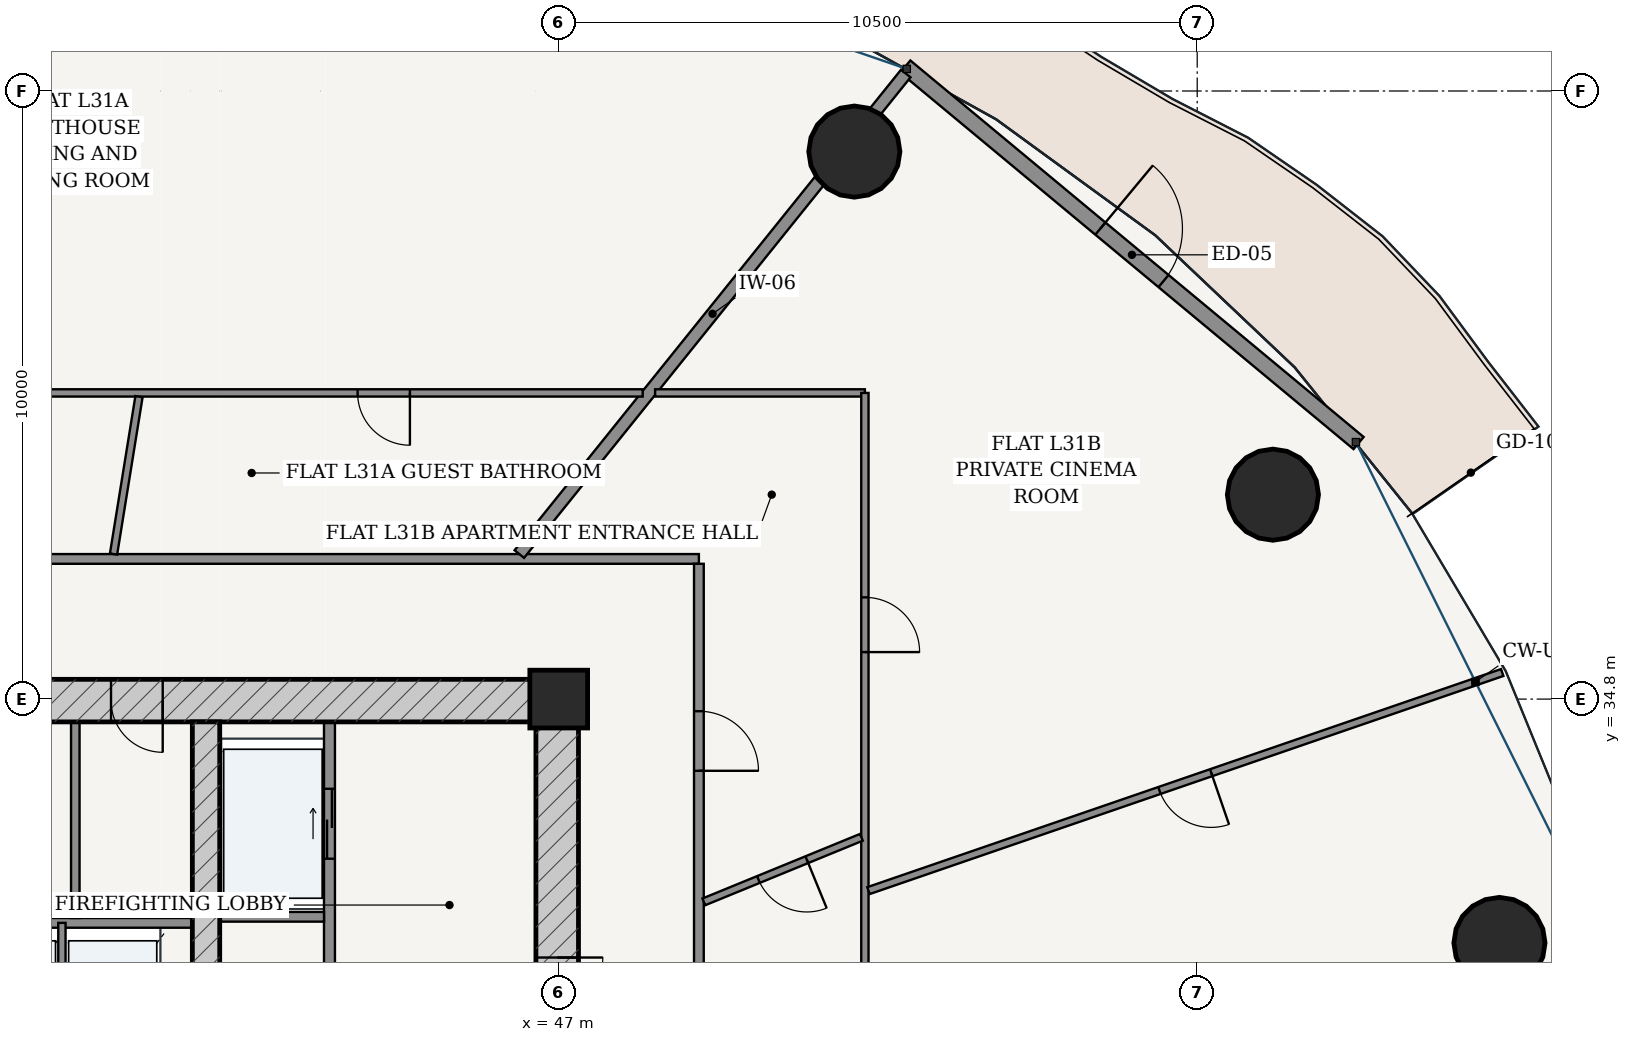
"""IFC4 building model, lengths in metres.
Left out: names, types, materials, properties, quantities, classifications, styles, units other than length and angle.
Written with IfcOpenShell. Run it as: python <this file> out.ifc"""

import sys

from ifc_helpers import new_model, si_unit, direction, frame, frame_2d, origin, origin_2d, place, context, subcontext, project, spatial, rectangle, hollow_circle, extrude, source, transform, mapped, element, fill, save


model = new_model("IFC4")
c1 = context("Model", 3, precision=1e-05, world=origin(), true_north=direction((-0.2419218956, 0.970295726276)))
c2 = subcontext(c1, "Body", "Model", "MODEL_VIEW")
j1 = project(units=[si_unit("LENGTHUNIT", "METRE"), si_unit("PLANEANGLEUNIT", "RADIAN")], contexts=[c1])
p1 = place(None, origin())
s1 = spatial("IfcSite", under=j1, at=p1, CompositionType="ELEMENT")
p2 = place(p1, origin())
s2 = spatial("IfcBuilding", under=s1, at=p2, CompositionType="ELEMENT")
p3 = place(p2, frame((0.0, 0.0, 119.4)))
s3 = spatial("IfcBuildingStorey", under=s2, at=p3, CompositionType="ELEMENT", Elevation=119.4)
p4 = place(p3, frame((47.0, 34.8, 0.0), z_axis=(0.0, 0.0, 1.0), x_axis=(1.0, 0.0, 0.0)))
e1 = element("IfcColumn", 1, at=p4, inside=s3, PredefinedType="COLUMN", context=c2, shape_type="SweptSolid", body=[
    extrude(rectangle(XDim=0.95, YDim=0.95, at=origin_2d()), origin(), (0.0, 0.0, 1.0), 3.6),
])
p5 = place(p3, frame((28.675, 34.775, 0.0), z_axis=(0.0, 0.0, 1.0), x_axis=(1.0, 0.0, 0.0)))
e2 = element("IfcWall", 2, at=p5, inside=s3, PredefinedType="SHEAR", context=c2, shape_type="SweptSolid", body=[
    extrude(rectangle(XDim=18.65, YDim=0.7, at=frame_2d((9.325, 0.0))), origin(), (0.0, 0.0, 1.0), 3.325),
])
p6 = place(p5, frame((6.837, 0.0, 0.0)))
e3 = element("IfcOpeningElement", 3, at=p6, cuts=e2, PredefinedType="OPENING", context=c2, shape_type="SweptSolid", body=[
    extrude(rectangle(XDim=0.85, YDim=2.1, at=frame_2d((0.425, 1.05))), frame((0.0, 0.36, 0.0), z_axis=(0.0, -1.0, 0.0), x_axis=(1.0, 0.0, 0.0)), (0.0, 0.0, 1.0), 0.72),
])
p7 = place(p5, frame((8.895, 0.0, 0.0)))
e4 = element("IfcOpeningElement", 4, at=p7, cuts=e2, PredefinedType="OPENING", context=c2, shape_type="SweptSolid", body=[
    extrude(rectangle(XDim=0.86, YDim=2.1, at=frame_2d((0.43, 1.05))), frame((0.0, 0.36, 0.0), z_axis=(0.0, -1.0, 0.0), x_axis=(1.0, 0.0, 0.0)), (0.0, 0.0, 1.0), 0.72),
])
p8 = place(p5, frame((10.962, 0.0, 0.0)))
e5 = element("IfcOpeningElement", 5, at=p8, cuts=e2, PredefinedType="OPENING", context=c2, shape_type="SweptSolid", body=[
    extrude(rectangle(XDim=0.85, YDim=2.1, at=frame_2d((0.425, 1.05))), frame((0.0, 0.36, 0.0), z_axis=(0.0, -1.0, 0.0), x_axis=(1.0, 0.0, 0.0)), (0.0, 0.0, 1.0), 0.72),
])
p9 = place(p3, frame((46.975, 19.175, 0.0), z_axis=(0.0, 0.0, 1.0), x_axis=(0.0, 1.0, 0.0)))
e6 = element("IfcWall", 6, at=p9, inside=s3, PredefinedType="SHEAR", context=c2, shape_type="SweptSolid", body=[
    extrude(rectangle(XDim=15.25, YDim=0.7, at=frame_2d((7.625, 0.0))), origin(), (0.0, 0.0, 1.0), 3.325),
])
p10 = place(p9, frame((9.875, 0.0, 0.0)))
e7 = element("IfcOpeningElement", 7, at=p10, cuts=e6, PredefinedType="OPENING", context=c2, shape_type="SweptSolid", body=[
    extrude(rectangle(XDim=1.5, YDim=2.2, at=frame_2d((0.75, 1.1))), frame((0.0, 0.36, 0.0), z_axis=(0.0, -1.0, 0.0), x_axis=(1.0, 0.0, 0.0)), (0.0, 0.0, 1.0), 0.72),
])
p11 = place(p3, frame((41.2, 19.175, 0.0), z_axis=(0.0, 0.0, 1.0), x_axis=(0.0, 1.0, 0.0)))
e8 = element("IfcWall", 8, at=p11, inside=s3, PredefinedType="SHEAR", context=c2, shape_type="SweptSolid", body=[
    extrude(rectangle(XDim=15.25, YDim=0.45, at=frame_2d((7.625, 0.0))), origin(), (0.0, 0.0, 1.0), 3.325),
])
p12 = place(p11, frame((7.8, 0.0, 0.0)))
e9 = element("IfcOpeningElement", 9, at=p12, cuts=e8, PredefinedType="OPENING", context=c2, shape_type="SweptSolid", body=[
    extrude(rectangle(XDim=1.05, YDim=2.15, at=frame_2d((0.525, 1.075))), frame((0.0, 0.235, 0.0), z_axis=(0.0, -1.0, 0.0), x_axis=(1.0, 0.0, 0.0)), (0.0, 0.0, 1.0), 0.47),
])
for number, where, z_axis, x_axis in (
    (10, (62.471, 30.79, 0.0), (0.0, 0.0, 1.0), (1.0, 0.0, 0.0)),
    (11, (58.745, 38.161, 0.0), (0.0, 0.0, 1.0), (1.0, 0.0, 0.0)),
    (12, (51.862, 43.803, 0.0), (0.0, 0.0, 1.0), (1.0, 0.0, 0.0)),
):
    element("IfcColumn", number, at=place(p3, frame(where, z_axis=z_axis, x_axis=x_axis)), inside=s3, PredefinedType="COLUMN", context=c2, shape_type="SweptSolid", body=[
        extrude(hollow_circle(Radius=0.75, WallThickness=0.045, at=origin_2d()), origin(), (0.0, 0.0, 1.0), 3.6),
    ])
p13 = place(p3, frame((60.154, 39.01, 0.0), z_axis=(0.0, 0.0, 1.0), x_axis=(-0.769242574941, 0.638956853706, 0.0)))
e13 = element("IfcWall", 13, at=p13, inside=s3, PredefinedType="SOLIDWALL", context=c2, shape_type="SweptSolid", body=[
    extrude(rectangle(XDim=9.69, YDim=0.26, at=frame_2d((4.845, 0.0))), origin(), (0.0, 0.0, 1.0), 3.325),
])
p14 = place(p13, frame((4.17, 0.0, 0.0)))
e14 = element("IfcOpeningElement", 14, at=p14, cuts=e13, PredefinedType="OPENING", context=c2, shape_type="SweptSolid", body=[
    extrude(rectangle(XDim=1.35, YDim=2.2, at=frame_2d((0.675, 1.1))), frame((0.0, 0.14, 0.0), z_axis=(0.0, -1.0, 0.0), x_axis=(1.0, 0.0, 0.0)), (0.0, 0.0, 1.0), 0.28),
])
p15 = place(p3, frame((43.23, 28.52, 0.0), z_axis=(0.0, 0.0, 1.0), x_axis=(0.0, 1.0, 0.0)))
e15 = element("IfcWall", 15, at=p15, inside=s3, PredefinedType="PARTITIONING", context=c2, shape_type="SweptSolid", body=[
    extrude(rectangle(XDim=5.905, YDim=0.18, at=frame_2d((2.953, 0.0))), origin(), (0.0, 0.0, 1.0), 3.325),
])
p16 = place(p15, frame((0.905, 0.0, 0.0)))
e16 = element("IfcOpeningElement", 16, at=p16, cuts=e15, PredefinedType="OPENING", context=c2, shape_type="SweptSolid", body=[
    extrude(rectangle(XDim=0.85, YDim=2.1, at=frame_2d((0.425, 1.05))), frame((0.0, 0.1, 0.0), z_axis=(0.0, -1.0, 0.0), x_axis=(1.0, 0.0, 0.0)), (0.0, 0.0, 1.0), 0.2),
])
p17 = place(p15, frame((3.655, 0.0, 0.0)))
e17 = element("IfcOpeningElement", 17, at=p17, cuts=e15, PredefinedType="OPENING", context=c2, shape_type="SweptSolid", body=[
    extrude(rectangle(XDim=1.15, YDim=2.2, at=frame_2d((0.575, 1.1))), frame((0.0, 0.1, 0.0), z_axis=(0.0, -1.0, 0.0), x_axis=(1.0, 0.0, 0.0)), (0.0, 0.0, 1.0), 0.2),
])
p18 = place(p3, frame((41.425, 31.22, 0.0), z_axis=(0.0, 0.0, 1.0), x_axis=(1.0, 0.0, 0.0)))
e18 = element("IfcWall", 18, at=p18, inside=s3, PredefinedType="PARTITIONING", context=c2, shape_type="SweptSolid", body=[
    extrude(rectangle(XDim=1.715, YDim=0.16, at=frame_2d((0.857, 0.0))), origin(), (0.0, 0.0, 1.0), 3.325),
])
p19 = place(p3, frame((35.025, 31.12, 0.0), z_axis=(0.0, 0.0, 1.0), x_axis=(1.0, 0.0, 0.0)))
e19 = element("IfcWall", 19, at=p19, inside=s3, PredefinedType="PARTITIONING", context=c2, shape_type="SweptSolid", body=[
    extrude(rectangle(XDim=5.95, YDim=0.16, at=frame_2d((2.975, 0.0))), origin(), (0.0, 0.0, 1.0), 3.325),
])
p20 = place(p3, frame((38.83, 28.56, 0.0), z_axis=(0.0, 0.0, 1.0), x_axis=(0.0, 1.0, 0.0)))
e20 = element("IfcWall", 20, at=p20, inside=s3, PredefinedType="PARTITIONING", context=c2, shape_type="SweptSolid", body=[
    extrude(rectangle(XDim=2.56, YDim=0.12, at=frame_2d((1.28, 0.0))), origin(), (0.0, 0.0, 1.0), 3.325),
])
p21 = place(p3, frame((39.05, 31.2, 0.0), z_axis=(0.0, 0.0, 1.0), x_axis=(0.0, 1.0, 0.0)))
e21 = element("IfcWall", 21, at=p21, inside=s3, PredefinedType="PARTITIONING", context=c2, shape_type="SweptSolid", body=[
    extrude(rectangle(XDim=3.225, YDim=0.14, at=frame_2d((1.613, 0.0))), origin(), (0.0, 0.0, 1.0), 3.325),
])
p22 = place(p3, frame((26.695, 37.105, 0.0), z_axis=(0.0, 0.0, 1.0), x_axis=(1.0, 0.0, 0.0)))
e22 = element("IfcWall", 22, at=p22, inside=s3, PredefinedType="PARTITIONING", context=c2, shape_type="SweptSolid", body=[
    extrude(rectangle(XDim=22.61, YDim=0.16, at=frame_2d((11.305, 0.0))), origin(), (0.0, 0.0, 1.0), 2.767),
])
p23 = place(p3, frame((49.305, 16.575, 0.0), z_axis=(0.0, 0.0, 1.0), x_axis=(0.0, 1.0, 0.0)))
e23 = element("IfcWall", 23, at=p23, inside=s3, PredefinedType="PARTITIONING", context=c2, shape_type="SweptSolid", body=[
    extrude(rectangle(XDim=20.45, YDim=0.16, at=frame_2d((10.225, 0.0))), origin(), (0.0, 0.0, 1.0), 2.767),
])
p24 = place(p23, frame((17.046, 0.0, 0.0)))
e24 = element("IfcOpeningElement", 24, at=p24, cuts=e23, PredefinedType="OPENING", context=c2, shape_type="SweptSolid", body=[
    extrude(rectangle(XDim=0.98, YDim=2.2, at=frame_2d((0.49, 1.1))), frame((0.0, 0.09, 0.0), z_axis=(0.0, -1.0, 0.0), x_axis=(1.0, 0.0, 0.0)), (0.0, 0.0, 1.0), 0.18),
])
p25 = place(p3, frame((46.352, 37.185, 0.0), z_axis=(0.0, 0.0, 1.0), x_axis=(0.626712884514, 0.779250255299, 0.0)))
e25 = element("IfcWall", 25, at=p25, inside=s3, PredefinedType="PARTITIONING", context=c2, shape_type="SweptSolid", body=[
    extrude(rectangle(XDim=10.141, YDim=0.2, at=frame_2d((5.07, 0.0))), origin(), (0.0, 0.0, 1.0), 2.767),
])
p26 = place(p3, frame((23.965, 39.835, 0.0), z_axis=(0.0, 0.0, 1.0), x_axis=(1.0, 0.0, 0.0)))
e26 = element("IfcWall", 26, at=p26, inside=s3, PredefinedType="PARTITIONING", context=c2, shape_type="SweptSolid", body=[
    extrude(rectangle(XDim=24.416, YDim=0.12, at=frame_2d((12.208, 0.0))), origin(), (0.0, 0.0, 1.0), 2.767),
])
p27 = place(p26, frame((4.192, 0.0, 0.0)))
e27 = element("IfcOpeningElement", 27, at=p27, cuts=e26, PredefinedType="OPENING", context=c2, shape_type="SweptSolid", body=[
    extrude(rectangle(XDim=0.9, YDim=2.15, at=frame_2d((0.45, 1.075))), frame((0.0, 0.07, 0.0), z_axis=(0.0, -1.0, 0.0), x_axis=(1.0, 0.0, 0.0)), (0.0, 0.0, 1.0), 0.14),
])
p28 = place(p26, frame((19.728, 0.0, 0.0)))
e28 = element("IfcOpeningElement", 28, at=p28, cuts=e26, PredefinedType="OPENING", context=c2, shape_type="SweptSolid", body=[
    extrude(rectangle(XDim=0.86, YDim=2.15, at=frame_2d((0.43, 1.075))), frame((0.0, 0.07, 0.0), z_axis=(0.0, -1.0, 0.0), x_axis=(1.0, 0.0, 0.0)), (0.0, 0.0, 1.0), 0.14),
])
p29 = place(p3, frame((39.679, 37.185, 0.0), z_axis=(0.0, 0.0, 1.0), x_axis=(0.159580767408, 0.98718487563, 0.0)))
e29 = element("IfcWall", 29, at=p29, inside=s3, PredefinedType="PARTITIONING", context=c2, shape_type="SweptSolid", body=[
    extrude(rectangle(XDim=2.622, YDim=0.12, at=frame_2d((1.311, 0.0))), origin(), (0.0, 0.0, 1.0), 3.325),
])
p30 = place(p3, frame((48.585, 39.835, 0.0), z_axis=(0.0, 0.0, 1.0), x_axis=(1.0, 0.0, 0.0)))
e30 = element("IfcWall", 30, at=p30, inside=s3, PredefinedType="PARTITIONING", context=c2, shape_type="SweptSolid", body=[
    extrude(rectangle(XDim=3.45, YDim=0.12, at=frame_2d((1.725, 0.0))), origin(), (0.0, 0.0, 1.0), 2.767),
])
p31 = place(p3, frame((52.035, 39.835, 0.0), z_axis=(0.0, 0.0, 1.0), x_axis=(0.0, -1.0, 0.0)))
e31 = element("IfcWall", 31, at=p31, inside=s3, PredefinedType="PARTITIONING", context=c2, shape_type="SweptSolid", body=[
    extrude(rectangle(XDim=26.07, YDim=0.12, at=frame_2d((13.035, 0.0))), origin(), (0.0, 0.0, 1.0), 2.767),
])
p32 = place(p31, frame((3.362, 0.0, 0.0)))
e32 = element("IfcOpeningElement", 32, at=p32, cuts=e31, PredefinedType="OPENING", context=c2, shape_type="SweptSolid", body=[
    extrude(rectangle(XDim=0.9, YDim=2.15, at=frame_2d((0.45, 1.075))), frame((0.0, 0.07, 0.0), z_axis=(0.0, -1.0, 0.0), x_axis=(1.0, 0.0, 0.0)), (0.0, 0.0, 1.0), 0.14),
])
p33 = place(p31, frame((13.924, 0.0, 0.0)))
e33 = element("IfcOpeningElement", 33, at=p33, cuts=e31, PredefinedType="OPENING", context=c2, shape_type="SweptSolid", body=[
    extrude(rectangle(XDim=0.9, YDim=2.15, at=frame_2d((0.45, 1.075))), frame((0.0, 0.07, 0.0), z_axis=(0.0, -1.0, 0.0), x_axis=(1.0, 0.0, 0.0)), (0.0, 0.0, 1.0), 0.14),
])
p34 = place(p3, frame((52.094, 31.65, 0.0), z_axis=(0.0, 0.0, 1.0), x_axis=(0.945573120726, 0.32540970078, 0.0)))
e34 = element("IfcWall", 34, at=p34, inside=s3, PredefinedType="PARTITIONING", context=c2, shape_type="SweptSolid", body=[
    extrude(rectangle(XDim=11.022, YDim=0.12, at=frame_2d((5.511, 0.0))), origin(), (0.0, 0.0, 1.0), 2.767),
])
p35 = place(p34, frame((5.061, 0.0, 0.0)))
e35 = element("IfcOpeningElement", 35, at=p35, cuts=e34, PredefinedType="OPENING", context=c2, shape_type="SweptSolid", body=[
    extrude(rectangle(XDim=0.9, YDim=2.15, at=frame_2d((0.45, 1.075))), frame((0.0, 0.07, 0.0), z_axis=(0.0, -1.0, 0.0), x_axis=(1.0, 0.0, 0.0)), (0.0, 0.0, 1.0), 0.14),
])
p36 = place(p3, frame((49.387, 31.465, 0.0), z_axis=(0.0, 0.0, 1.0), x_axis=(0.925328713836, 0.37916588896, 0.0)))
e36 = element("IfcWall", 36, at=p36, inside=s3, PredefinedType="PARTITIONING", context=c2, shape_type="SweptSolid", body=[
    extrude(rectangle(XDim=2.8, YDim=0.12, at=frame_2d((1.4, 0.0))), origin(), (0.0, 0.0, 1.0), 3.325),
])
p37 = place(p36, frame((0.97, 0.0, 0.0)))
e37 = element("IfcOpeningElement", 37, at=p37, cuts=e36, PredefinedType="OPENING", context=c2, shape_type="SweptSolid", body=[
    extrude(rectangle(XDim=0.86, YDim=2.15, at=frame_2d((0.43, 1.075))), frame((0.0, 0.07, 0.0), z_axis=(0.0, -1.0, 0.0), x_axis=(1.0, 0.0, 0.0)), (0.0, 0.0, 1.0), 0.14),
])
m1 = source(origin(), c2, "Body", "SweptSolid", [
    extrude(rectangle(XDim=1.35, YDim=2.2, at=frame_2d((0.675, 1.1))), frame((0.0, 0.025, 0.0), z_axis=(0.0, -1.0, 0.0), x_axis=(1.0, 0.0, 0.0)), (0.0, 0.0, 1.0), 0.05),
])
p38 = place(p14, frame((1.35, 0.0, 0.0), z_axis=(0.0, 0.0, 1.0), x_axis=(-1.0, 0.0, 0.0)))
e38 = element("IfcDoor", 38, at=p38, inside=s3, OperationType="SINGLE_SWING_LEFT", PredefinedType="DOOR", context=c2, shape_type="MappedRepresentation", body=[
    mapped(m1, transform((0.0, 0.0, 0.0), scale=1.0)),
])
fill(e14, e38)
m2 = source(origin(), c2, "Body", "SweptSolid", [
    extrude(rectangle(XDim=1.5, YDim=2.2, at=frame_2d((0.75, 1.1))), frame((0.0, 0.025, 0.0), z_axis=(0.0, -1.0, 0.0), x_axis=(1.0, 0.0, 0.0)), (0.0, 0.0, 1.0), 0.05),
])
p39 = place(p10, frame((1.5, 0.0, 0.0), z_axis=(0.0, 0.0, 1.0), x_axis=(-1.0, 0.0, 0.0)))
e39 = element("IfcDoor", 39, at=p39, inside=s3, OperationType="DOUBLE_DOOR_SINGLE_SWING", PredefinedType="DOOR", context=c2, shape_type="MappedRepresentation", body=[
    mapped(m2, transform((0.0, 0.0, 0.0), scale=1.0)),
])
fill(e7, e39)
m3 = source(origin(), c2, "Body", "SweptSolid", [
    extrude(rectangle(XDim=0.85, YDim=2.1, at=frame_2d((0.425, 1.05))), frame((0.0, 0.025, 0.0), z_axis=(0.0, -1.0, 0.0), x_axis=(1.0, 0.0, 0.0)), (0.0, 0.0, 1.0), 0.05),
])
p40 = place(p8, frame((0.85, 0.0, 0.0), z_axis=(0.0, 0.0, 1.0), x_axis=(-1.0, 0.0, 0.0)))
e40 = element("IfcDoor", 40, at=p40, inside=s3, OperationType="SINGLE_SWING_LEFT", PredefinedType="DOOR", context=c2, shape_type="MappedRepresentation", body=[
    mapped(m3, transform((0.0, 0.0, 0.0), scale=1.0)),
])
fill(e5, e40)
m4 = source(origin(), c2, "Body", "SweptSolid", [
    extrude(rectangle(XDim=1.15, YDim=2.2, at=frame_2d((0.575, 1.1))), frame((0.0, 0.025, 0.0), z_axis=(0.0, -1.0, 0.0), x_axis=(1.0, 0.0, 0.0)), (0.0, 0.0, 1.0), 0.05),
])
p41 = place(p17, origin())
e41 = element("IfcDoor", 41, at=p41, inside=s3, OperationType="DOUBLE_DOOR_SLIDING", PredefinedType="DOOR", context=c2, shape_type="MappedRepresentation", body=[
    mapped(m4, transform((0.0, 0.0, 0.0), scale=1.0)),
])
fill(e17, e41)
m5 = source(origin(), c2, "Body", "SweptSolid", [
    extrude(rectangle(XDim=0.86, YDim=2.15, at=frame_2d((0.43, 1.075))), frame((0.0, 0.025, 0.0), z_axis=(0.0, -1.0, 0.0), x_axis=(1.0, 0.0, 0.0)), (0.0, 0.0, 1.0), 0.05),
])
p42 = place(p28, frame((0.86, 0.0, 0.0), z_axis=(0.0, 0.0, 1.0), x_axis=(-1.0, 0.0, 0.0)))
e42 = element("IfcDoor", 42, at=p42, inside=s3, OperationType="SINGLE_SWING_LEFT", PredefinedType="DOOR", context=c2, shape_type="MappedRepresentation", body=[
    mapped(m5, transform((0.0, 0.0, 0.0), scale=1.0)),
])
fill(e28, e42)
m6 = source(origin(), c2, "Body", "SweptSolid", [
    extrude(rectangle(XDim=0.98, YDim=2.2, at=frame_2d((0.49, 1.1))), frame((0.0, 0.025, 0.0), z_axis=(0.0, -1.0, 0.0), x_axis=(1.0, 0.0, 0.0)), (0.0, 0.0, 1.0), 0.05),
])
p43 = place(p24, frame((0.98, 0.0, 0.0), z_axis=(0.0, 0.0, 1.0), x_axis=(-1.0, 0.0, 0.0)))
e43 = element("IfcDoor", 43, at=p43, inside=s3, OperationType="SINGLE_SWING_RIGHT", PredefinedType="DOOR", context=c2, shape_type="MappedRepresentation", body=[
    mapped(m6, transform((0.0, 0.0, 0.0), scale=1.0)),
])
fill(e24, e43)
p44 = place(p37, frame((0.86, 0.0, 0.0), z_axis=(0.0, 0.0, 1.0), x_axis=(-1.0, 0.0, 0.0)))
e44 = element("IfcDoor", 44, at=p44, inside=s3, OperationType="SINGLE_SWING_LEFT", PredefinedType="DOOR", context=c2, shape_type="MappedRepresentation", body=[
    mapped(m5, transform((0.0, 0.0, 0.0), scale=1.0)),
])
fill(e37, e44)
m7 = source(origin(), c2, "Body", "SweptSolid", [
    extrude(rectangle(XDim=0.9, YDim=2.15, at=frame_2d((0.45, 1.075))), frame((0.0, 0.025, 0.0), z_axis=(0.0, -1.0, 0.0), x_axis=(1.0, 0.0, 0.0)), (0.0, 0.0, 1.0), 0.05),
])
p45 = place(p32, origin())
e45 = element("IfcDoor", 45, at=p45, inside=s3, OperationType="SINGLE_SWING_RIGHT", PredefinedType="DOOR", context=c2, shape_type="MappedRepresentation", body=[
    mapped(m7, transform((0.0, 0.0, 0.0), scale=1.0)),
])
fill(e32, e45)
p46 = place(p35, frame((0.9, 0.0, 0.0), z_axis=(0.0, 0.0, 1.0), x_axis=(-1.0, 0.0, 0.0)))
e46 = element("IfcDoor", 46, at=p46, inside=s3, OperationType="SINGLE_SWING_LEFT", PredefinedType="DOOR", context=c2, shape_type="MappedRepresentation", body=[
    mapped(m7, transform((0.0, 0.0, 0.0), scale=1.0)),
])
fill(e35, e46)
save(model, sys.argv[1])
